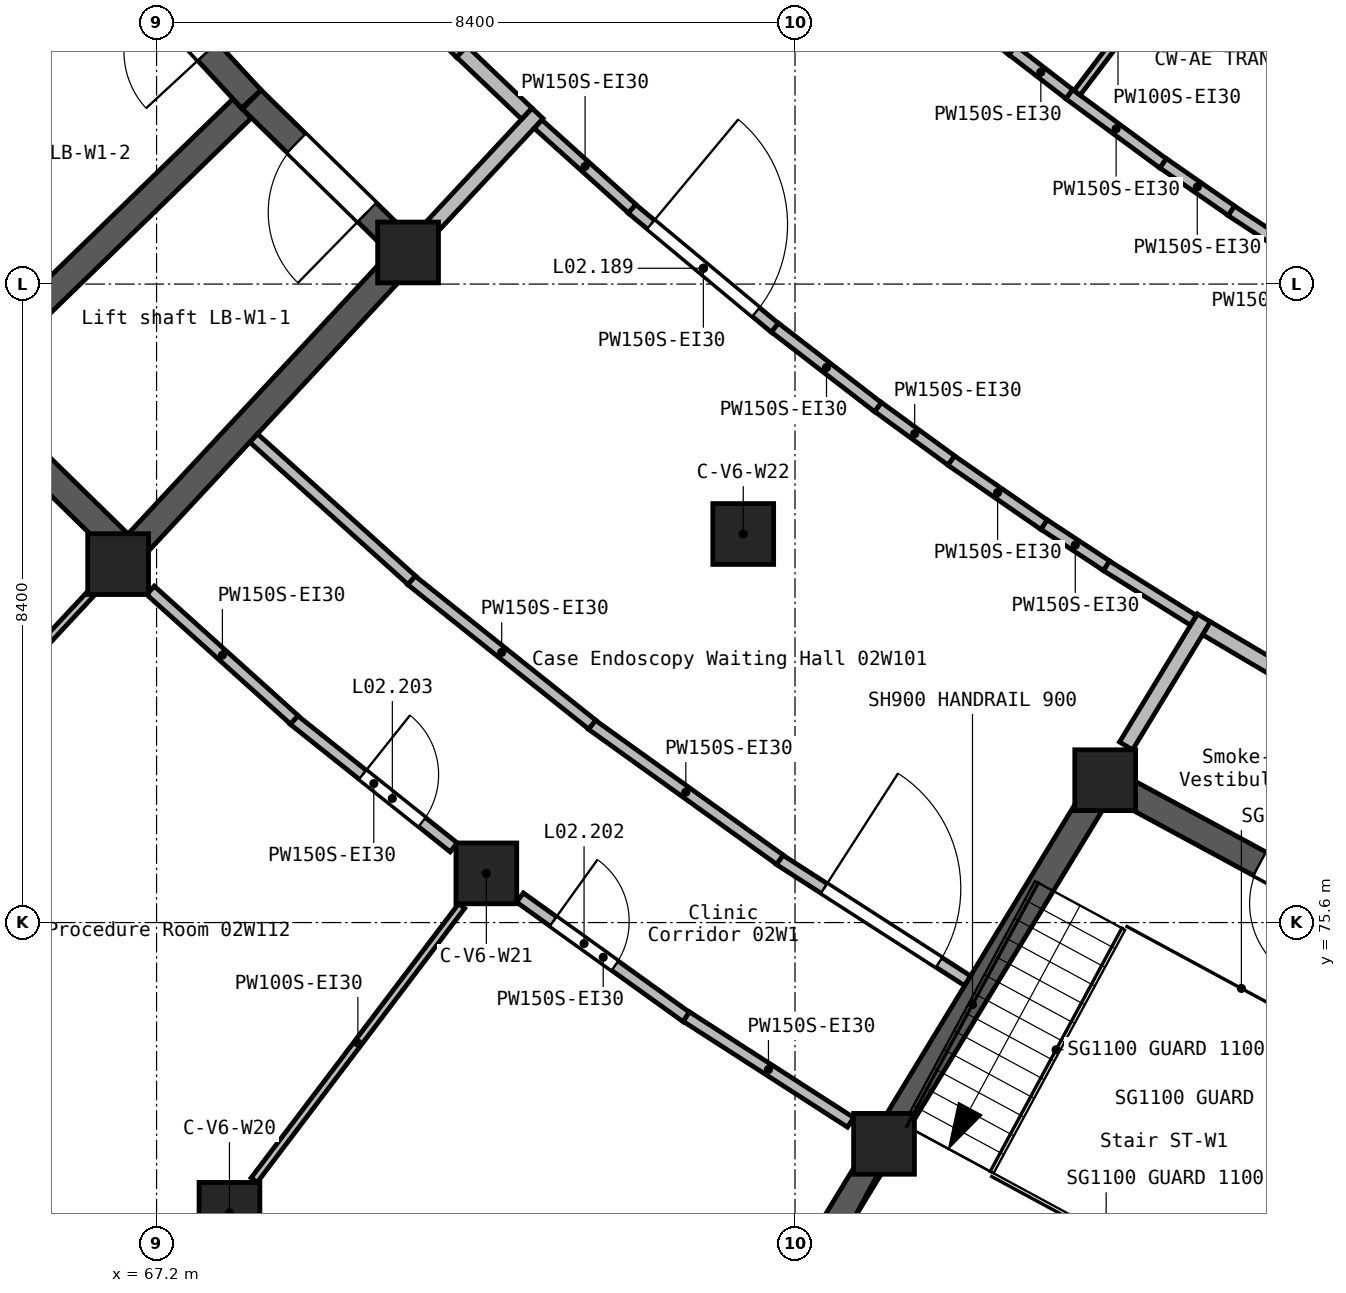
"""IFC4 building model, lengths in metres.
Left out: names, types, materials, properties, quantities, classifications, styles, units other than length and angle.
Written with IfcOpenShell. Run it as: python <this file> out.ifc"""

import sys

from ifc_helpers import new_model, si_unit, direction, frame, frame_2d, origin, origin_2d, place, context, subcontext, project, spatial, rectangle, extrude, element, fill, save


model = new_model("IFC4")
c1 = context("Model", 3, precision=1e-05, world=origin(), true_north=direction((0.0, 1.0)))
c2 = subcontext(c1, "Body", "Model", "MODEL_VIEW")
j1 = project(units=[si_unit("LENGTHUNIT", "METRE"), si_unit("PLANEANGLEUNIT", "RADIAN")], contexts=[c1])
p1 = place(None, origin())
s1 = spatial("IfcSite", under=j1, at=p1, CompositionType="ELEMENT")
p2 = place(p1, origin())
s2 = spatial("IfcBuilding", under=s1, at=p2, CompositionType="ELEMENT")
p3 = place(p2, frame((0.0, 0.0, 12.6)))
s3 = spatial("IfcBuildingStorey", under=s2, at=p3, CompositionType="ELEMENT", Elevation=12.6)
for number, where, z_axis, x_axis in (
    (1, (66.694, 80.316, 0.0), (0.0, 0.0, 1.0), (1.0, 0.0, 0.0)),
    (2, (68.159, 71.781, 0.0), (0.0, 0.0, 1.0), (1.0, 0.0, 0.0)),
    (3, (70.509, 84.416, 0.0), (0.0, 0.0, 1.0), (1.0, 0.0, 0.0)),
    (4, (71.539, 76.247, 0.0), (0.0, 0.0, 1.0), (1.0, 0.0, 0.0)),
    (5, (74.919, 80.712, 0.0), (0.0, 0.0, 1.0), (1.0, 0.0, 0.0)),
    (6, (76.771, 72.689, 0.0), (0.0, 0.0, 1.0), (1.0, 0.0, 0.0)),
    (7, (79.681, 77.473, 0.0), (0.0, 0.0, 1.0), (1.0, 0.0, 0.0)),
):
    element("IfcColumn", number, at=place(p3, frame(where, z_axis=z_axis, x_axis=x_axis)), inside=s3, PredefinedType="COLUMN", context=c2, shape_type="SweptSolid", body=[
        extrude(rectangle(XDim=0.8, YDim=0.8, at=origin_2d()), origin(), (0.0, 0.0, 1.0), 4.2),
    ])
p4 = place(p3, frame((62.305, 84.872, 0.0), z_axis=(0.0, 0.0, 1.0), x_axis=(0.751808220443, 0.659381831471, 0.0)))
e8 = element("IfcWall", 8, at=p4, inside=s3, PredefinedType="SHEAR", context=c2, shape_type="SweptSolid", body=[
    extrude(rectangle(XDim=5.75, YDim=0.35, at=frame_2d((2.875, 0.0))), origin(), (0.0, 0.0, 1.0), 4.2),
])
p5 = place(p3, frame((64.579, 82.666, 0.0), z_axis=(0.0, 0.0, 1.0), x_axis=(0.714695816666, -0.699435407769, 0.0)))
e9 = element("IfcWall", 9, at=p5, inside=s3, PredefinedType="SHEAR", context=c2, shape_type="SweptSolid", body=[
    extrude(rectangle(XDim=2.976, YDim=0.35, at=frame_2d((1.488, 0.0))), origin(), (0.0, 0.0, 1.0), 4.2),
])
p6 = place(p3, frame((64.702, 82.791, 0.0), z_axis=(0.0, 0.0, 1.0), x_axis=(0.717400873641, 0.696660596345, 0.0)))
e10 = element("IfcWall", 10, at=p6, inside=s3, PredefinedType="SHEAR", context=c2, shape_type="SweptSolid", body=[
    extrude(rectangle(XDim=5.05, YDim=0.35, at=frame_2d((2.525, 0.0))), origin(), (0.0, 0.0, 1.0), 4.2),
])
p7 = place(p3, frame((66.712, 80.334, 0.0), z_axis=(0.0, 0.0, 1.0), x_axis=(0.681084356202, 0.732204957465, 0.0)))
e11 = element("IfcWall", 11, at=p7, inside=s3, PredefinedType="SHEAR", context=c2, shape_type="SweptSolid", body=[
    extrude(rectangle(XDim=5.75, YDim=0.35, at=frame_2d((2.875, 0.0))), origin(), (0.0, 0.0, 1.0), 4.2),
])
p8 = place(p3, frame((68.447, 86.434, 0.0), z_axis=(0.0, 0.0, 1.0), x_axis=(-0.678058558992, 0.735007884704, 0.0)))
e12 = element("IfcWall", 12, at=p8, inside=s3, PredefinedType="SHEAR", context=c2, shape_type="SweptSolid", body=[
    extrude(rectangle(XDim=2.701, YDim=0.35, at=frame_2d((1.35, 0.0))), origin(), (0.0, 0.0, 1.0), 4.2),
])
p9 = place(p8, frame((0.85, 0.0, 0.0)))
e13 = element("IfcOpeningElement", 13, at=p9, cuts=e12, PredefinedType="OPENING", context=c2, shape_type="SweptSolid", body=[
    extrude(rectangle(XDim=1.1, YDim=2.1, at=frame_2d((0.55, 1.05))), frame((0.0, 0.185, 0.0), z_axis=(0.0, -1.0, 0.0), x_axis=(1.0, 0.0, 0.0)), (0.0, 0.0, 1.0), 0.37),
])
p10 = place(p3, frame((70.384, 84.538, 0.0), z_axis=(0.0, 0.0, 1.0), x_axis=(-0.714701443082, 0.699429658548, 0.0)))
e14 = element("IfcWall", 14, at=p10, inside=s3, PredefinedType="SHEAR", context=c2, shape_type="SweptSolid", body=[
    extrude(rectangle(XDim=2.702, YDim=0.35, at=frame_2d((1.351, 0.0))), origin(), (0.0, 0.0, 1.0), 4.2),
])
p11 = place(p10, frame((0.581, 0.0, 0.0)))
e15 = element("IfcOpeningElement", 15, at=p11, cuts=e14, PredefinedType="OPENING", context=c2, shape_type="SweptSolid", body=[
    extrude(rectangle(XDim=1.3, YDim=2.1, at=frame_2d((0.65, 1.05))), frame((0.0, 0.185, 0.0), z_axis=(0.0, -1.0, 0.0), x_axis=(1.0, 0.0, 0.0)), (0.0, 0.0, 1.0), 0.37),
])
p12 = place(p3, frame((75.848, 71.173, 0.0), z_axis=(0.0, 0.0, 1.0), x_axis=(0.51973149438, 0.854329663391, 0.0)))
e16 = element("IfcWall", 16, at=p12, inside=s3, PredefinedType="SHEAR", context=c2, shape_type="SweptSolid", body=[
    extrude(rectangle(XDim=7.55, YDim=0.35, at=frame_2d((3.775, 0.0))), origin(), (0.0, 0.0, 1.0), 4.2),
])
p13 = place(p3, frame((81.572, 68.077, 0.0), z_axis=(0.0, 0.0, 1.0), x_axis=(0.430592498036, 0.90254645345, 0.0)))
e17 = element("IfcWall", 17, at=p13, inside=s3, PredefinedType="SHEAR", context=c2, shape_type="SweptSolid", body=[
    extrude(rectangle(XDim=7.55, YDim=0.35, at=frame_2d((3.775, 0.0))), origin(), (0.0, 0.0, 1.0), 4.2),
])
p14 = place(p3, frame((84.593, 74.816, 0.0), z_axis=(0.0, 0.0, 1.0), x_axis=(-0.879585553739, 0.475740742058, 0.0)))
e18 = element("IfcWall", 18, at=p14, inside=s3, PredefinedType="SHEAR", context=c2, shape_type="SweptSolid", body=[
    extrude(rectangle(XDim=5.409, YDim=0.35, at=frame_2d((2.705, 0.0))), origin(), (0.0, 0.0, 1.0), 4.2),
])
p15 = place(p14, frame((2.174, 0.0, 0.0)))
e19 = element("IfcOpeningElement", 19, at=p15, cuts=e18, PredefinedType="OPENING", context=c2, shape_type="SweptSolid", body=[
    extrude(rectangle(XDim=1.1, YDim=2.1, at=frame_2d((0.55, 1.05))), frame((0.0, 0.185, 0.0), z_axis=(0.0, -1.0, 0.0), x_axis=(1.0, 0.0, 0.0)), (0.0, 0.0, 1.0), 0.37),
])
p16 = place(p3, frame((70.837, 84.769, 0.0), z_axis=(0.0, 0.0, 1.0), x_axis=(0.681244203436, 0.732056237789, 0.0)))
e20 = element("IfcWall", 20, at=p16, inside=s3, PredefinedType="SOLIDWALL", context=c2, shape_type="SweptSolid", body=[
    extrude(rectangle(XDim=2.018, YDim=0.2, at=frame_2d((1.009, 0.0))), origin(), (0.0, 0.0, 1.0), 3.85),
])
p17 = place(p3, frame((79.955, 77.924, 0.0), z_axis=(0.0, 0.0, 1.0), x_axis=(0.519675881268, 0.85436349315, 0.0)))
e21 = element("IfcWall", 21, at=p17, inside=s3, PredefinedType="SOLIDWALL", context=c2, shape_type="SweptSolid", body=[
    extrude(rectangle(XDim=1.972, YDim=0.2, at=frame_2d((0.986, 0.0))), origin(), (0.0, 0.0, 1.0), 3.85),
])
p18 = place(p3, frame((70.101, 88.174, 0.0), z_axis=(0.0, 0.0, 1.0), x_axis=(0.705714994949, -0.708495833371, 0.0)))
e22 = element("IfcWall", 22, at=p18, inside=s3, PredefinedType="SOLIDWALL", context=c2, shape_type="SweptSolid", body=[
    extrude(rectangle(XDim=1.58, YDim=0.2, at=frame_2d((0.79, 0.0))), origin(), (0.0, 0.0, 1.0), 3.85),
])
p19 = place(p18, frame((0.19, 0.0, 0.0)))
e23 = element("IfcOpeningElement", 23, at=p19, cuts=e22, PredefinedType="OPENING", context=c2, shape_type="SweptSolid", body=[
    extrude(rectangle(XDim=1.2, YDim=2.1, at=frame_2d((0.6, 1.05))), frame((0.0, 0.11, 0.0), z_axis=(0.0, -1.0, 0.0), x_axis=(1.0, 0.0, 0.0)), (0.0, 0.0, 1.0), 0.22),
])
p20 = place(p3, frame((81.015, 79.471, 0.0), z_axis=(0.0, 0.0, 1.0), x_axis=(0.860926528214, -0.508729312127, 0.0)))
e24 = element("IfcWall", 24, at=p20, inside=s3, PredefinedType="SOLIDWALL", context=c2, shape_type="SweptSolid", body=[
    extrude(rectangle(XDim=1.379, YDim=0.2, at=frame_2d((0.689, 0.0))), origin(), (0.0, 0.0, 1.0), 3.85),
])
p21 = place(p3, frame((71.217, 87.058, 0.0), z_axis=(0.0, 0.0, 1.0), x_axis=(0.723660671666, -0.6901559478, 0.0)))
e25 = element("IfcWall", 25, at=p21, inside=s3, PredefinedType="SOLIDWALL", context=c2, shape_type="SweptSolid", body=[
    extrude(rectangle(XDim=1.18, YDim=0.2, at=frame_2d((0.59, 0.0))), origin(), (0.0, 0.0, 1.0), 3.85),
])
p22 = place(p3, frame((71.982, 75.929, 0.0), z_axis=(0.0, 0.0, 1.0), x_axis=(0.812329236441, -0.583199118332, 0.0)))
e26 = element("IfcWall", 26, at=p22, inside=s3, PredefinedType="PARTITIONING", context=c2, shape_type="SweptSolid", body=[
    extrude(rectangle(XDim=2.695, YDim=0.15, at=frame_2d((1.347, 0.0))), origin(), (0.0, 0.0, 1.0), 3.85),
])
p23 = place(p22, frame((0.537, 0.0, 0.0)))
e27 = element("IfcOpeningElement", 27, at=p23, cuts=e26, PredefinedType="OPENING", context=c2, shape_type="SweptSolid", body=[
    extrude(rectangle(XDim=1.0, YDim=2.1, at=frame_2d((0.5, 1.05))), frame((0.0, 0.085, 0.0), z_axis=(0.0, -1.0, 0.0), x_axis=(1.0, 0.0, 0.0)), (0.0, 0.0, 1.0), 0.17),
])
p24 = place(p3, frame((69.006, 78.267, 0.0), z_axis=(0.0, 0.0, 1.0), x_axis=(0.781841800916, -0.623476862715, 0.0)))
e28 = element("IfcWall", 28, at=p24, inside=s3, PredefinedType="PARTITIONING", context=c2, shape_type="SweptSolid", body=[
    extrude(rectangle(XDim=2.69, YDim=0.15, at=frame_2d((1.345, 0.0))), origin(), (0.0, 0.0, 1.0), 3.85),
])
p25 = place(p24, frame((1.157, 0.0, 0.0)))
e29 = element("IfcOpeningElement", 29, at=p25, cuts=e28, PredefinedType="OPENING", context=c2, shape_type="SweptSolid", body=[
    extrude(rectangle(XDim=1.0, YDim=2.1, at=frame_2d((0.5, 1.05))), frame((0.0, 0.085, 0.0), z_axis=(0.0, -1.0, 0.0), x_axis=(1.0, 0.0, 0.0)), (0.0, 0.0, 1.0), 0.17),
])
p26 = place(p3, frame((74.17, 74.362, 0.0), z_axis=(0.0, 0.0, 1.0), x_axis=(0.840928399131, -0.541146401203, 0.0)))
e30 = element("IfcWall", 30, at=p26, inside=s3, PredefinedType="PARTITIONING", context=c2, shape_type="SweptSolid", body=[
    extrude(rectangle(XDim=2.57, YDim=0.15, at=frame_2d((1.285, 0.0))), origin(), (0.0, 0.0, 1.0), 3.85),
])
p27 = place(p3, frame((67.12, 79.971, 0.0), z_axis=(0.0, 0.0, 1.0), x_axis=(0.743284610851, -0.668975326355, 0.0)))
e31 = element("IfcWall", 31, at=p27, inside=s3, PredefinedType="PARTITIONING", context=c2, shape_type="SweptSolid", body=[
    extrude(rectangle(XDim=2.546, YDim=0.15, at=frame_2d((1.273, 0.0))), origin(), (0.0, 0.0, 1.0), 3.85),
])
p28 = place(p3, frame((75.396, 76.427, 0.0), z_axis=(0.0, 0.0, 1.0), x_axis=(0.840919451001, -0.541160306128, 0.0)))
e32 = element("IfcWall", 32, at=p28, inside=s3, PredefinedType="PARTITIONING", context=c2, shape_type="SweptSolid", body=[
    extrude(rectangle(XDim=2.941, YDim=0.15, at=frame_2d((1.47, 0.0))), origin(), (0.0, 0.0, 1.0), 3.85),
])
p29 = place(p28, frame((0.697, 0.0, 0.0)))
e33 = element("IfcOpeningElement", 33, at=p29, cuts=e32, PredefinedType="OPENING", context=c2, shape_type="SweptSolid", body=[
    extrude(rectangle(XDim=1.8, YDim=2.1, at=frame_2d((0.9, 1.05))), frame((0.0, 0.085, 0.0), z_axis=(0.0, -1.0, 0.0), x_axis=(1.0, 0.0, 0.0)), (0.0, 0.0, 1.0), 0.17),
])
for number, where, z_axis, x_axis in (
    (34, (72.926, 78.204, 0.0), (0.0, 0.0, 1.0), (0.812, -0.583, 0.0)),
    (35, (70.55, 80.105, 0.0), (0.0, 0.0, 1.0), (0.782, -0.624, 0.0)),
):
    element("IfcWall", number, at=place(p3, frame(where, z_axis=z_axis, x_axis=x_axis)), inside=s3, PredefinedType="PARTITIONING", context=c2, shape_type="SweptSolid", body=[
        extrude(rectangle(XDim=3.046, YDim=0.15, at=frame_2d((1.523, 0.0))), origin(), (0.0, 0.0, 1.0), 3.85),
    ])
p30 = place(p3, frame((68.478, 81.974, 0.0), z_axis=(0.0, 0.0, 1.0), x_axis=(0.743546016741, -0.66868476952, 0.0)))
e36 = element("IfcWall", 36, at=p30, inside=s3, PredefinedType="PARTITIONING", context=c2, shape_type="SweptSolid", body=[
    extrude(rectangle(XDim=2.795, YDim=0.15, at=frame_2d((1.397, 0.0))), origin(), (0.0, 0.0, 1.0), 3.85),
])
p31 = place(p3, frame((73.452, 84.992, 0.0), z_axis=(0.0, 0.0, 1.0), x_axis=(0.768531506517, -0.639811943849, 0.0)))
e37 = element("IfcWall", 37, at=p31, inside=s3, PredefinedType="PARTITIONING", context=c2, shape_type="SweptSolid", body=[
    extrude(rectangle(XDim=2.45, YDim=0.15, at=frame_2d((1.225, 0.0))), origin(), (0.0, 0.0, 1.0), 3.85),
])
p32 = place(p31, frame((0.325, 0.0, 0.0)))
e38 = element("IfcOpeningElement", 38, at=p32, cuts=e37, PredefinedType="OPENING", context=c2, shape_type="SweptSolid", body=[
    extrude(rectangle(XDim=1.8, YDim=2.1, at=frame_2d((0.9, 1.05))), frame((0.0, 0.085, 0.0), z_axis=(0.0, -1.0, 0.0), x_axis=(1.0, 0.0, 0.0)), (0.0, 0.0, 1.0), 0.17),
])
p33 = place(p3, frame((72.22, 86.105, 0.0), z_axis=(0.0, 0.0, 1.0), x_axis=(0.743337937966, -0.668916070954, 0.0)))
e39 = element("IfcWall", 39, at=p33, inside=s3, PredefinedType="PARTITIONING", context=c2, shape_type="SweptSolid", body=[
    extrude(rectangle(XDim=1.663, YDim=0.15, at=frame_2d((0.832, 0.0))), origin(), (0.0, 0.0, 1.0), 3.85),
])
p34 = place(p3, frame((77.051, 88.236, 0.0), z_axis=(0.0, 0.0, 1.0), x_axis=(0.771517511576, -0.636208086502, 0.0)))
e40 = element("IfcWall", 40, at=p34, inside=s3, PredefinedType="PARTITIONING", context=c2, shape_type="SweptSolid", body=[
    extrude(rectangle(XDim=1.828, YDim=0.15, at=frame_2d((0.914, 0.0))), origin(), (0.0, 0.0, 1.0), 3.85),
])
p35 = place(p3, frame((75.335, 83.428, 0.0), z_axis=(0.0, 0.0, 1.0), x_axis=(0.791538398042, -0.611119435483, 0.0)))
e41 = element("IfcWall", 41, at=p35, inside=s3, PredefinedType="PARTITIONING", context=c2, shape_type="SweptSolid", body=[
    extrude(rectangle(XDim=1.716, YDim=0.15, at=frame_2d((0.858, 0.0))), origin(), (0.0, 0.0, 1.0), 3.85),
])
p36 = place(p3, frame((79.206, 86.5, 0.0), z_axis=(0.0, 0.0, 1.0), x_axis=(0.804960127747, -0.593328907721, 0.0)))
e42 = element("IfcWall", 42, at=p36, inside=s3, PredefinedType="PARTITIONING", context=c2, shape_type="SweptSolid", body=[
    extrude(rectangle(XDim=1.539, YDim=0.15, at=frame_2d((0.77, 0.0))), origin(), (0.0, 0.0, 1.0), 3.85),
])
p37 = place(p3, frame((79.695, 80.295, 0.0), z_axis=(0.0, 0.0, 1.0), x_axis=(0.847541618724, -0.530728936964, 0.0)))
e43 = element("IfcWall", 43, at=p37, inside=s3, PredefinedType="PARTITIONING", context=c2, shape_type="SweptSolid", body=[
    extrude(rectangle(XDim=1.353, YDim=0.15, at=frame_2d((0.676, 0.0))), origin(), (0.0, 0.0, 1.0), 3.85),
])
p38 = place(p3, frame((77.653, 81.68, 0.0), z_axis=(0.0, 0.0, 1.0), x_axis=(0.822646640465, -0.568552992194, 0.0)))
e44 = element("IfcWall", 44, at=p38, inside=s3, PredefinedType="PARTITIONING", context=c2, shape_type="SweptSolid", body=[
    extrude(rectangle(XDim=1.488, YDim=0.15, at=frame_2d((0.744, 0.0))), origin(), (0.0, 0.0, 1.0), 3.85),
])
p39 = place(p3, frame((76.693, 82.382, 0.0), z_axis=(0.0, 0.0, 1.0), x_axis=(0.808088805309, -0.589060678312, 0.0)))
e45 = element("IfcWall", 45, at=p39, inside=s3, PredefinedType="PARTITIONING", context=c2, shape_type="SweptSolid", body=[
    extrude(rectangle(XDim=1.192, YDim=0.15, at=frame_2d((0.596, 0.0))), origin(), (0.0, 0.0, 1.0), 3.85),
])
p40 = place(p3, frame((81.338, 84.965, 0.0), z_axis=(0.0, 0.0, 1.0), x_axis=(0.834958204617, -0.550313362134, 0.0)))
e46 = element("IfcWall", 46, at=p40, inside=s3, PredefinedType="PARTITIONING", context=c2, shape_type="SweptSolid", body=[
    extrude(rectangle(XDim=1.389, YDim=0.15, at=frame_2d((0.695, 0.0))), origin(), (0.0, 0.0, 1.0), 3.85),
])
p41 = place(p3, frame((80.444, 85.589, 0.0), z_axis=(0.0, 0.0, 1.0), x_axis=(0.821096473197, -0.570789437274, 0.0)))
e47 = element("IfcWall", 47, at=p41, inside=s3, PredefinedType="PARTITIONING", context=c2, shape_type="SweptSolid", body=[
    extrude(rectangle(XDim=1.093, YDim=0.15, at=frame_2d((0.546, 0.0))), origin(), (0.0, 0.0, 1.0), 3.85),
])
p42 = place(p3, frame((78.877, 80.836, 0.0), z_axis=(0.0, 0.0, 1.0), x_axis=(0.835209839134, -0.549931381733, 0.0)))
e48 = element("IfcWall", 48, at=p42, inside=s3, PredefinedType="PARTITIONING", context=c2, shape_type="SweptSolid", body=[
    extrude(rectangle(XDim=0.982, YDim=0.15, at=frame_2d((0.491, 0.0))), origin(), (0.0, 0.0, 1.0), 3.85),
])
p43 = place(p3, frame((78.46, 87.077, 0.0), z_axis=(0.0, 0.0, 1.0), x_axis=(0.791671493317, -0.610947008069, 0.0)))
e49 = element("IfcWall", 49, at=p43, inside=s3, PredefinedType="PARTITIONING", context=c2, shape_type="SweptSolid", body=[
    extrude(rectangle(XDim=0.944, YDim=0.15, at=frame_2d((0.472, 0.0))), origin(), (0.0, 0.0, 1.0), 3.85),
])
p44 = place(p3, frame((63.244, 76.607, 0.0), z_axis=(0.0, 0.0, 1.0), x_axis=(0.681263193371, 0.732038565485, 0.0)))
e50 = element("IfcWall", 50, at=p44, inside=s3, PredefinedType="PARTITIONING", context=c2, shape_type="SweptSolid", body=[
    extrude(rectangle(XDim=4.529, YDim=0.1, at=frame_2d((2.265, 0.0))), origin(), (0.0, 0.0, 1.0), 3.85),
])
p45 = place(p3, frame((68.483, 72.211, 0.0), z_axis=(0.0, 0.0, 1.0), x_axis=(0.603594766434, 0.797291262923, 0.0)))
e51 = element("IfcWall", 51, at=p45, inside=s3, PredefinedType="PARTITIONING", context=c2, shape_type="SweptSolid", body=[
    extrude(rectangle(XDim=4.524, YDim=0.1, at=frame_2d((2.262, 0.0))), origin(), (0.0, 0.0, 1.0), 3.85),
])
p46 = place(p3, frame((79.312, 86.515, 0.0), z_axis=(0.0, 0.0, 1.0), x_axis=(0.603588624137, 0.797295912954, 0.0)))
e52 = element("IfcWall", 52, at=p46, inside=s3, PredefinedType="PARTITIONING", context=c2, shape_type="SweptSolid", body=[
    extrude(rectangle(XDim=1.782, YDim=0.1, at=frame_2d((0.891, 0.0))), origin(), (0.0, 0.0, 1.0), 3.85),
])
p47 = place(p29, frame((1.8, 0.0, 0.0), z_axis=(0.0, 0.0, 1.0), x_axis=(-1.0, 0.0, 0.0)))
e53 = element("IfcDoor", 53, at=p47, inside=s3, OperationType="DOUBLE_DOOR_SINGLE_SWING", PredefinedType="DOOR", context=c2, shape_type="SweptSolid", body=[
    extrude(rectangle(XDim=1.8, YDim=2.1, at=frame_2d((0.9, 1.05))), frame((0.0, 0.025, 0.0), z_axis=(0.0, -1.0, 0.0), x_axis=(1.0, 0.0, 0.0)), (0.0, 0.0, 1.0), 0.05),
])
fill(e33, e53)
p48 = place(p32, origin())
e54 = element("IfcDoor", 54, at=p48, inside=s3, OperationType="DOUBLE_DOOR_SINGLE_SWING", PredefinedType="DOOR", context=c2, shape_type="SweptSolid", body=[
    extrude(rectangle(XDim=1.8, YDim=2.1, at=frame_2d((0.9, 1.05))), frame((0.0, 0.025, 0.0), z_axis=(0.0, -1.0, 0.0), x_axis=(1.0, 0.0, 0.0)), (0.0, 0.0, 1.0), 0.05),
])
fill(e38, e54)
p49 = place(p23, frame((1.0, 0.0, 0.0), z_axis=(0.0, 0.0, 1.0), x_axis=(-1.0, 0.0, 0.0)))
e55 = element("IfcDoor", 55, at=p49, inside=s3, OperationType="SINGLE_SWING_RIGHT", PredefinedType="DOOR", context=c2, shape_type="SweptSolid", body=[
    extrude(rectangle(XDim=1.0, YDim=2.1, at=frame_2d((0.5, 1.05))), frame((0.0, 0.025, 0.0), z_axis=(0.0, -1.0, 0.0), x_axis=(1.0, 0.0, 0.0)), (0.0, 0.0, 1.0), 0.05),
])
fill(e27, e55)
p50 = place(p25, frame((1.0, 0.0, 0.0), z_axis=(0.0, 0.0, 1.0), x_axis=(-1.0, 0.0, 0.0)))
e56 = element("IfcDoor", 56, at=p50, inside=s3, OperationType="SINGLE_SWING_LEFT", PredefinedType="DOOR", context=c2, shape_type="SweptSolid", body=[
    extrude(rectangle(XDim=1.0, YDim=2.1, at=frame_2d((0.5, 1.05))), frame((0.0, 0.025, 0.0), z_axis=(0.0, -1.0, 0.0), x_axis=(1.0, 0.0, 0.0)), (0.0, 0.0, 1.0), 0.05),
])
fill(e29, e56)
p51 = place(p15, origin())
e57 = element("IfcDoor", 57, at=p51, inside=s3, OperationType="SINGLE_SWING_RIGHT", PredefinedType="DOOR", context=c2, shape_type="SweptSolid", body=[
    extrude(rectangle(XDim=1.1, YDim=2.1, at=frame_2d((0.55, 1.05))), frame((0.0, 0.025, 0.0), z_axis=(0.0, -1.0, 0.0), x_axis=(1.0, 0.0, 0.0)), (0.0, 0.0, 1.0), 0.05),
])
fill(e19, e57)
p52 = place(p11, origin())
e58 = element("IfcDoor", 58, at=p52, inside=s3, OperationType="DOUBLE_DOOR_SLIDING", PredefinedType="DOOR", context=c2, shape_type="SweptSolid", body=[
    extrude(rectangle(XDim=1.3, YDim=2.1, at=frame_2d((0.65, 1.05))), frame((0.0, 0.025, 0.0), z_axis=(0.0, -1.0, 0.0), x_axis=(1.0, 0.0, 0.0)), (0.0, 0.0, 1.0), 0.05),
])
fill(e15, e58)
p53 = place(p9, origin())
e59 = element("IfcDoor", 59, at=p53, inside=s3, OperationType="DOUBLE_DOOR_SLIDING", PredefinedType="DOOR", context=c2, shape_type="SweptSolid", body=[
    extrude(rectangle(XDim=1.1, YDim=2.1, at=frame_2d((0.55, 1.05))), frame((0.0, 0.025, 0.0), z_axis=(0.0, -1.0, 0.0), x_axis=(1.0, 0.0, 0.0)), (0.0, 0.0, 1.0), 0.05),
])
fill(e13, e59)
save(model, sys.argv[1])
